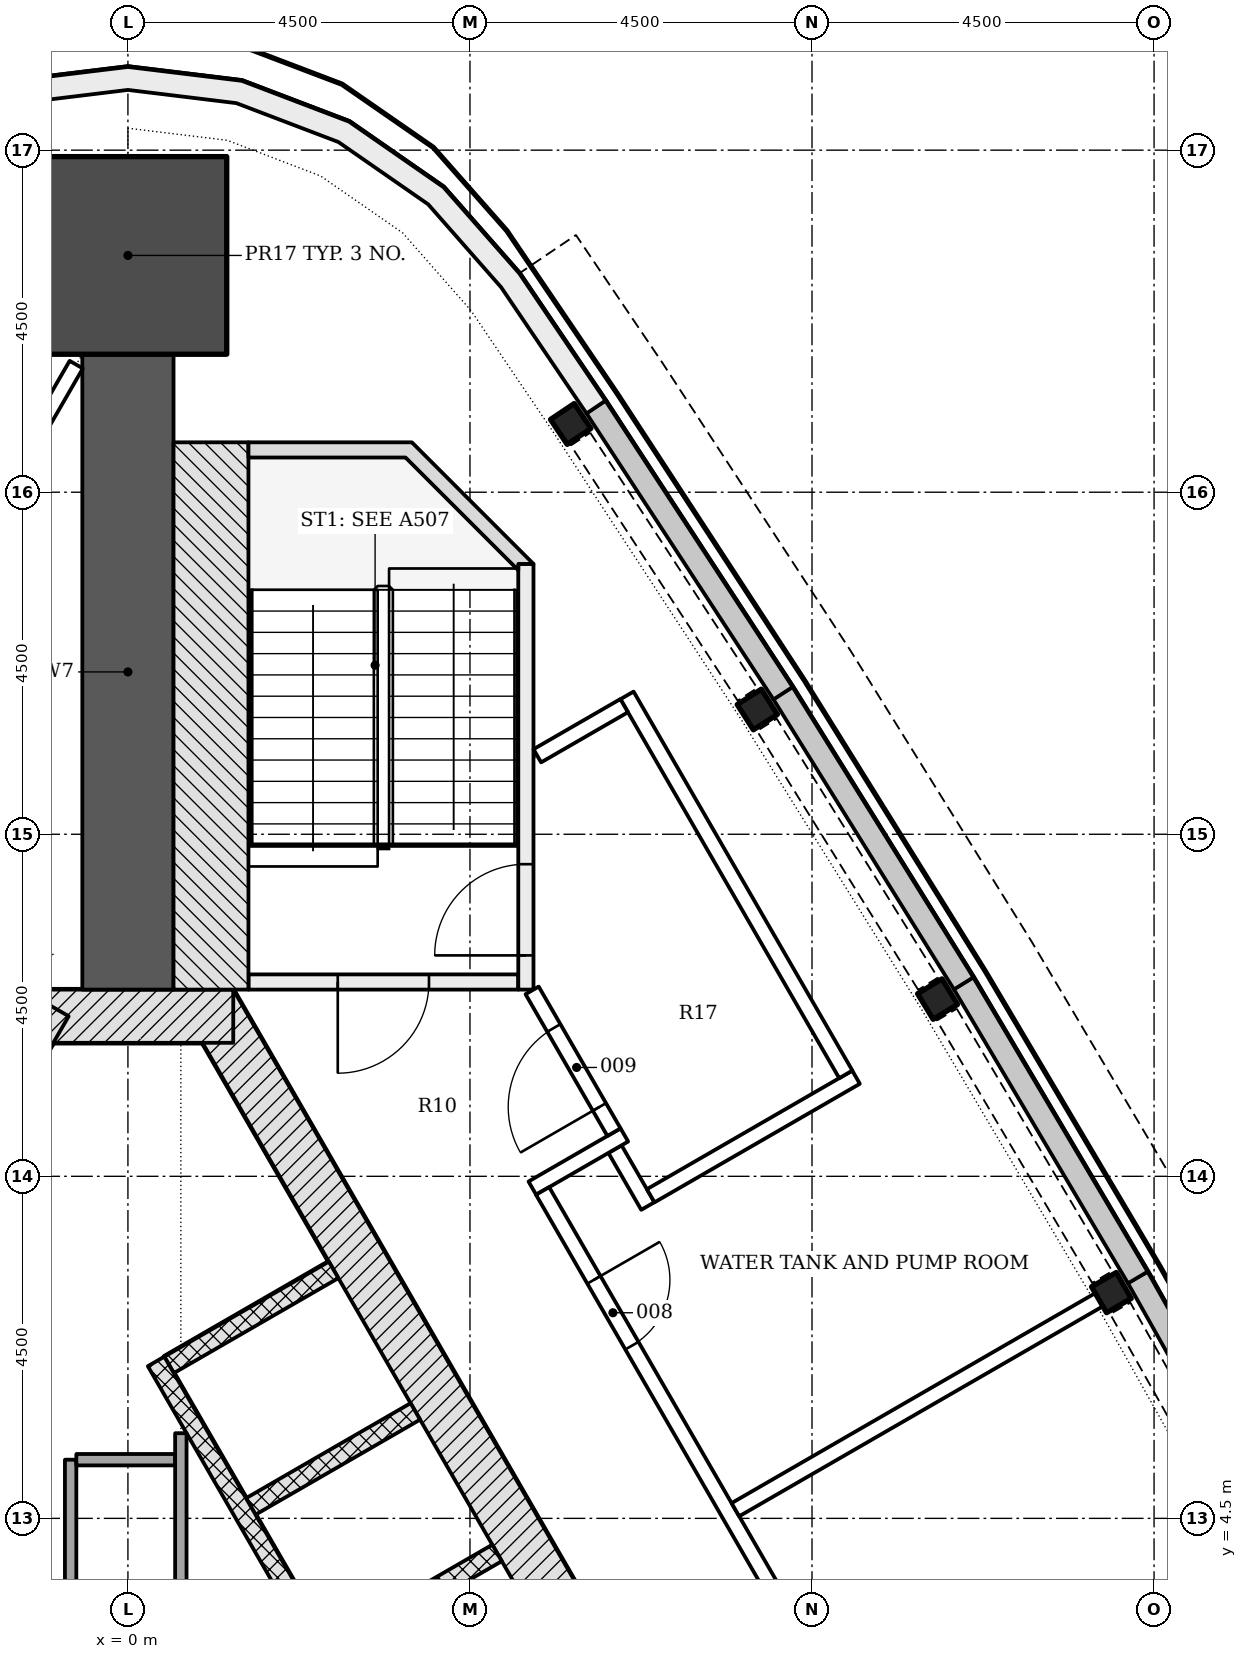
"""IFC4 building model, lengths in metres.
Left out: names, types, materials, properties, quantities, classifications, styles, units other than length and angle.
Written with IfcOpenShell. Run it as: python <this file> out.ifc"""

import sys

from ifc_helpers import new_model, si_unit, direction, frame, frame_2d, origin, origin_2d, place, context, subcontext, project, spatial, polyline, rectangle, i_section, outline, extrude, element, fill, save


model = new_model("IFC4")
c1 = context("Model", 3, precision=1e-05, world=origin(), true_north=direction((0.0, 1.0)))
c2 = subcontext(c1, "Body", "Model", "MODEL_VIEW")
j1 = project(units=[si_unit("LENGTHUNIT", "METRE"), si_unit("PLANEANGLEUNIT", "RADIAN")], contexts=[c1])
p1 = place(None, origin())
s1 = spatial("IfcSite", under=j1, at=p1, CompositionType="ELEMENT")
p2 = place(p1, origin())
s2 = spatial("IfcBuilding", under=s1, at=p2, CompositionType="ELEMENT")
p3 = place(p2, frame((0.0, 0.0, 210.3)))
s3 = spatial("IfcBuildingStorey", under=s2, at=p3, CompositionType="ELEMENT", Elevation=210.3)
p4 = place(p3, frame((10.311, -4.703, -0.3), z_axis=(0.0, 0.0, 1.0), x_axis=(-0.500001446645, 0.866024568562, 0.0)))
e1 = element("IfcWall", 1, at=p4, inside=s3, PredefinedType="SHEAR", context=c2, shape_type="SweptSolid", body=[
    extrude(rectangle(XDim=18.458, YDim=0.7, at=frame_2d((9.229, 0.0))), origin(), (0.0, 0.0, 1.0), 4.6),
])
p5 = place(p3, frame((1.386, 11.106, -0.3), z_axis=(0.0, 0.0, 1.0), x_axis=(-1.0, 0.0, 0.0)))
e2 = element("IfcWall", 2, at=p5, inside=s3, PredefinedType="SHEAR", context=c2, shape_type="SweptSolid", body=[
    extrude(rectangle(XDim=2.771, YDim=0.7, at=frame_2d((1.386, 0.0))), origin(), (0.0, 0.0, 1.0), 4.6),
])
p6 = place(p3, frame((-1.083, 11.281, -0.3), z_axis=(0.0, 0.0, 1.0), x_axis=(-0.500001446645, -0.866024568562, 0.0)))
e3 = element("IfcWall", 3, at=p6, inside=s3, PredefinedType="SHEAR", context=c2, shape_type="SweptSolid", body=[
    extrude(rectangle(XDim=18.458, YDim=0.7, at=frame_2d((9.229, 0.0))), origin(), (0.0, 0.0, 1.0), 4.6),
])
p7 = place(p6, frame((8.979, 0.0, 0.3)))
e4 = element("IfcOpeningElement", 4, at=p7, cuts=e3, PredefinedType="OPENING", context=c2, shape_type="SweptSolid", body=[
    extrude(rectangle(XDim=1.2, YDim=2.1, at=frame_2d((0.6, 1.05))), frame((0.0, 0.36, 0.0), z_axis=(0.0, -1.0, 0.0), x_axis=(1.0, 0.0, 0.0)), (0.0, 0.0, 1.0), 0.72),
])
p8 = place(p6, frame((11.029, 0.0, 0.3)))
e5 = element("IfcOpeningElement", 5, at=p8, cuts=e3, PredefinedType="OPENING", context=c2, shape_type="SweptSolid", body=[
    extrude(rectangle(XDim=1.2, YDim=2.1, at=frame_2d((0.6, 1.05))), frame((0.0, 0.36, 0.0), z_axis=(0.0, -1.0, 0.0), x_axis=(1.0, 0.0, 0.0)), (0.0, 0.0, 1.0), 0.72),
])
p9 = place(p3, frame((0.0, 11.456, -0.3), z_axis=(0.0, 0.0, 1.0), x_axis=(0.0, 1.0, 0.0)))
e6 = element("IfcWall", 6, at=p9, inside=s3, PredefinedType="SHEAR", context=c2, shape_type="SweptSolid", body=[
    extrude(rectangle(XDim=8.359, YDim=1.2, at=frame_2d((4.179, 0.0))), origin(), (0.0, 0.0, 1.0), 4.6),
])
p10 = place(p3, frame((0.0, 21.115, -0.3), z_axis=(0.0, 0.0, 1.0), x_axis=(0.0, 1.0, 0.0)))
e7 = element("IfcColumn", 7, at=p10, inside=s3, PredefinedType="COLUMN", context=c2, shape_type="SweptSolid", body=[
    extrude(rectangle(XDim=2.6, YDim=2.6, at=origin_2d()), origin(), (0.0, 0.0, 1.0), 4.6),
])
for number, where, z_axis, x_axis in (
    (8, (12.939, 7.47, -0.3), (0.0, 0.0, 1.0), (-0.5, 0.866, 0.0)),
    (9, (10.652, 11.332, -0.3), (0.0, 0.0, 1.0), (-0.519, 0.855, 0.0)),
    (10, (8.281, 15.142, -0.3), (0.0, 0.0, 1.0), (-0.538, 0.843, 0.0)),
    (11, (5.825, 18.898, -0.3), (0.0, 0.0, 1.0), (-0.556, 0.831, 0.0)),
):
    element("IfcColumn", number, at=place(p3, frame(where, z_axis=z_axis, x_axis=x_axis)), inside=s3, PredefinedType="COLUMN", context=c2, shape_type="SweptSolid", body=[
        extrude(i_section(OverallWidth=0.394, OverallDepth=0.376, WebThickness=0.017, FlangeThickness=0.028, FilletRadius=0.015, at=origin_2d()), origin(), (0.0, 0.0, 1.0), 4.6),
    ])
p11 = place(p3, origin())
e12 = element("IfcWall", 12, at=p11, inside=s3, PredefinedType="NOTDEFINED", context=c2, shape_type="SweptSolid", body=[
    extrude(outline(polyline([(15.622, 3.823), (13.415, 7.745), (13.154, 7.598), (15.36, 3.677), (15.622, 3.823)])), origin(), (0.0, 0.0, 1.0), 1.2),
])
p12 = place(p3, origin())
e13 = element("IfcWall", 13, at=p12, inside=s3, PredefinedType="NOTDEFINED", context=c2, shape_type="SweptSolid", body=[
    extrude(outline(polyline([(13.415, 7.745), (11.122, 11.617), (10.864, 11.464), (13.157, 7.592), (13.415, 7.745)])), origin(), (0.0, 0.0, 1.0), 1.2),
])
p13 = place(p3, origin())
e14 = element("IfcWall", 14, at=p13, inside=s3, PredefinedType="NOTDEFINED", context=c2, shape_type="SweptSolid", body=[
    extrude(outline(polyline([(11.122, 11.617), (8.744, 15.437), (8.49, 15.279), (10.867, 11.458), (11.122, 11.617)])), origin(), (0.0, 0.0, 1.0), 1.2),
])
p14 = place(p3, origin())
e15 = element("IfcWall", 15, at=p14, inside=s3, PredefinedType="NOTDEFINED", context=c2, shape_type="SweptSolid", body=[
    extrude(outline(polyline([(8.744, 15.437), (6.282, 19.204), (6.031, 19.04), (8.493, 15.273), (8.744, 15.437)])), origin(), (0.0, 0.0, 1.0), 1.2),
])
p15 = place(p3, origin())
e16 = element("IfcWall", 16, at=p15, inside=s3, PredefinedType="NOTDEFINED", context=c2, shape_type="SweptSolid", body=[
    extrude(outline(polyline([(6.282, 19.204), (5.149, 20.879), (4.151, 22.013), (2.911, 22.874), (1.499, 23.412), (0.0, 23.595), (-1.499, 23.412), (-2.911, 22.874), (-4.151, 22.013), (-5.149, 20.879), (-6.282, 19.204), (-6.034, 19.036), (-4.911, 20.695), (-3.95, 21.787), (-2.77, 22.607), (-1.427, 23.119), (0.0, 23.293), (1.427, 23.119), (2.77, 22.607), (3.95, 21.787), (4.911, 20.695), (6.034, 19.036), (6.282, 19.204)])), origin(), (0.0, 0.0, 1.0), 4.3),
])
for number, where, z_axis, x_axis in (
    (17, (4.856, 4.045, -0.3), (0.0, 0.0, 1.0), (-0.866, -0.5, 0.0)),
    (18, (3.781, 5.907, -0.3), (0.0, 0.0, 1.0), (-0.866, -0.5, 0.0)),
    (19, (2.706, 7.769, -0.3), (0.0, 0.0, 1.0), (-0.866, -0.5, 0.0)),
):
    element("IfcWall", number, at=place(p3, frame(where, z_axis=z_axis, x_axis=x_axis)), inside=s3, PredefinedType="PARTITIONING", context=c2, shape_type="SweptSolid", body=[
        extrude(rectangle(XDim=2.5, YDim=0.25, at=frame_2d((1.25, 0.0))), origin(), (0.0, 0.0, 1.0), 4.6),
    ])
p16 = place(p3, frame((5.87, -2.961, 0.0), z_axis=(0.0, 0.0, 1.0), x_axis=(-0.50000615651, 0.866021849293, 0.0)))
e20 = element("IfcWall", 20, at=p16, inside=s3, PredefinedType="PARTITIONING", context=c2, shape_type="SweptSolid", body=[
    extrude(rectangle(XDim=11.0, YDim=0.25, at=frame_2d((5.5, 0.0))), origin(), (0.0, 0.0, 1.0), 4.3),
])
p17 = place(p3, frame((-0.754, 5.272, 0.0), z_axis=(0.0, 0.0, 1.0), x_axis=(0.0, -1.0, 0.0)))
e21 = element("IfcWall", 21, at=p17, inside=s3, PredefinedType="PARTITIONING", context=c2, shape_type="SweptSolid", body=[
    extrude(rectangle(XDim=11.5, YDim=0.15, at=frame_2d((5.75, 0.0))), origin(), (0.0, 0.0, 1.0), 4.3),
])
p18 = place(p17, frame((3.701, 0.0, 0.0)))
e22 = element("IfcOpeningElement", 22, at=p18, cuts=e21, PredefinedType="OPENING", context=c2, shape_type="SweptSolid", body=[
    extrude(rectangle(XDim=0.9, YDim=2.1, at=frame_2d((0.45, 1.05))), frame((0.0, 0.085, 0.0), z_axis=(0.0, -1.0, 0.0), x_axis=(1.0, 0.0, 0.0)), (0.0, 0.0, 1.0), 0.17),
])
p19 = place(p3, frame((-0.679, 5.272, 0.0), z_axis=(0.0, 0.0, 1.0), x_axis=(1.0, 0.0, 0.0)))
e23 = element("IfcWall", 23, at=p19, inside=s3, PredefinedType="PARTITIONING", context=c2, shape_type="SweptSolid", body=[
    extrude(rectangle(XDim=1.3, YDim=0.15, at=frame_2d((0.65, 0.0))), origin(), (0.0, 0.0, 1.0), 4.3),
])
p20 = place(p3, frame((0.696, -5.928, 0.0), z_axis=(0.0, 0.0, 1.0), x_axis=(0.0, 1.0, 0.0)))
e24 = element("IfcWall", 24, at=p20, inside=s3, PredefinedType="PARTITIONING", context=c2, shape_type="SweptSolid", body=[
    extrude(rectangle(XDim=11.549, YDim=0.15, at=frame_2d((5.774, 0.0))), origin(), (0.0, 0.0, 1.0), 4.3),
])
p21 = place(p20, frame((6.6, 0.0, 0.0)))
e25 = element("IfcOpeningElement", 25, at=p21, cuts=e24, PredefinedType="OPENING", context=c2, shape_type="SweptSolid", body=[
    extrude(rectangle(XDim=0.9, YDim=2.1, at=frame_2d((0.45, 1.05))), frame((0.0, 0.085, 0.0), z_axis=(0.0, -1.0, 0.0), x_axis=(1.0, 0.0, 0.0)), (0.0, 0.0, 1.0), 0.17),
])
p22 = place(p3, frame((5.135, 11.556, -0.3), z_axis=(0.0, 0.0, 1.0), x_axis=(-1.0, 0.0, 0.0)))
e26 = element("IfcWall", 26, at=p22, inside=s3, PredefinedType="SHEAR", context=c2, shape_type="SweptSolid", body=[
    extrude(rectangle(XDim=3.55, YDim=0.2, at=frame_2d((1.775, 0.0))), origin(), (0.0, 0.0, 1.0), 4.6),
])
p23 = place(p22, frame((1.175, 0.0, 0.3)))
e27 = element("IfcOpeningElement", 27, at=p23, cuts=e26, PredefinedType="OPENING", context=c2, shape_type="SweptSolid", body=[
    extrude(rectangle(XDim=1.2, YDim=2.1, at=frame_2d((0.6, 1.05))), frame((0.0, 0.11, 0.0), z_axis=(0.0, -1.0, 0.0), x_axis=(1.0, 0.0, 0.0)), (0.0, 0.0, 1.0), 0.22),
])
p24 = place(p3, frame((5.236, 11.456, -0.3), z_axis=(0.0, 0.0, 1.0), x_axis=(0.0, 1.0, 0.0)))
e28 = element("IfcWall", 28, at=p24, inside=s3, PredefinedType="SHEAR", context=c2, shape_type="SweptSolid", body=[
    extrude(rectangle(XDim=5.6, YDim=0.2, at=frame_2d((2.8, 0.0))), origin(), (0.0, 0.0, 1.0), 4.6),
])
p25 = place(p24, frame((0.45, 0.0, 0.3)))
e29 = element("IfcOpeningElement", 29, at=p25, cuts=e28, PredefinedType="OPENING", context=c2, shape_type="SweptSolid", body=[
    extrude(rectangle(XDim=1.2, YDim=2.1, at=frame_2d((0.6, 1.05))), frame((0.0, 0.11, 0.0), z_axis=(0.0, -1.0, 0.0), x_axis=(1.0, 0.0, 0.0)), (0.0, 0.0, 1.0), 0.22),
])
p26 = place(p3, frame((1.093, 11.456, -0.3), z_axis=(0.0, 0.0, 1.0), x_axis=(0.0, 1.0, 0.0)))
e30 = element("IfcWall", 30, at=p26, inside=s3, PredefinedType="SHEAR", context=c2, shape_type="SweptSolid", body=[
    extrude(rectangle(XDim=7.2, YDim=0.986, at=frame_2d((3.6, 0.0))), origin(), (0.0, 0.0, 1.0), 4.6),
])
p27 = place(p3, frame((0.0, 0.0, -0.3)))
e31 = element("IfcWall", 31, at=p27, inside=s3, PredefinedType="SHEAR", context=c2, shape_type="SweptSolid", body=[
    extrude(outline(polyline([(5.336, 17.056), (3.736, 18.656), (1.586, 18.656), (1.586, 18.456), (3.653, 18.456), (5.135, 16.974), (5.135, 17.056), (5.135, 17.056), (5.135, 17.056), (5.135, 17.056), (5.135, 17.056), (5.135, 17.056), (5.135, 17.056), (5.135, 17.056), (5.135, 17.056), (5.135, 17.056), (5.135, 17.056), (5.135, 17.056), (5.135, 17.056), (5.135, 17.056), (5.135, 17.056), (5.135, 17.056), (5.135, 17.056), (5.336, 17.056)])), origin(), (0.0, 0.0, 1.0), 4.6),
])
p28 = place(p3, frame((-0.68, 19.678, 0.0), z_axis=(0.0, 0.0, 1.0), x_axis=(-0.49999622545, -0.866027583011, 0.0)))
e32 = element("IfcWall", 32, at=p28, inside=s3, PredefinedType="PARTITIONING", context=c2, shape_type="SweptSolid", body=[
    extrude(rectangle(XDim=23.956, YDim=0.2, at=frame_2d((11.978, 0.0))), origin(), (0.0, 0.0, 1.0), 3.752),
])
p29 = place(p28, frame((16.301, 0.0, 0.0)))
e33 = element("IfcOpeningElement", 33, at=p29, cuts=e32, PredefinedType="OPENING", context=c2, shape_type="SweptSolid", body=[
    extrude(rectangle(XDim=1.2, YDim=2.1, at=frame_2d((0.6, 1.05))), frame((0.0, 0.11, 0.0), z_axis=(0.0, -1.0, 0.0), x_axis=(1.0, 0.0, 0.0)), (0.0, 0.0, 1.0), 0.22),
])
p30 = place(p3, frame((6.408, 9.358, 0.0), z_axis=(0.0, 0.0, 1.0), x_axis=(0.49996696679, -0.866044474677, 0.0)))
e34 = element("IfcWall", 34, at=p30, inside=s3, PredefinedType="PARTITIONING", context=c2, shape_type="SweptSolid", body=[
    extrude(rectangle(XDim=0.864, YDim=0.2, at=frame_2d((0.432, 0.0))), origin(), (0.0, 0.0, 1.0), 3.752),
])
p31 = place(p3, frame((5.32, 8.845, 0.0), z_axis=(0.0, 0.0, 1.0), x_axis=(0.866031452229, 0.49998952364, 0.0)))
e35 = element("IfcWall", 35, at=p31, inside=s3, PredefinedType="PARTITIONING", context=c2, shape_type="SweptSolid", body=[
    extrude(rectangle(XDim=1.398, YDim=0.2, at=frame_2d((0.699, 0.0))), origin(), (0.0, 0.0, 1.0), 4.3),
])
p32 = place(p3, frame((6.395, 9.581, 0.0), z_axis=(0.0, 0.0, 1.0), x_axis=(-0.500003735859, 0.866023246874, 0.0)))
e36 = element("IfcWall", 36, at=p32, inside=s3, PredefinedType="PARTITIONING", context=c2, shape_type="SweptSolid", body=[
    extrude(rectangle(XDim=2.154, YDim=0.2, at=frame_2d((1.077, 0.0))), origin(), (0.0, 0.0, 1.0), 4.3),
])
p33 = place(p32, frame((0.383, 0.0, 0.0)))
e37 = element("IfcOpeningElement", 37, at=p33, cuts=e36, PredefinedType="OPENING", context=c2, shape_type="SweptSolid", body=[
    extrude(rectangle(XDim=1.2, YDim=2.1, at=frame_2d((0.6, 1.05))), frame((0.0, 0.11, 0.0), z_axis=(0.0, -1.0, 0.0), x_axis=(1.0, 0.0, 0.0)), (0.0, 0.0, 1.0), 0.22),
])
p34 = place(p3, frame((5.455, 8.808, 0.0), z_axis=(0.0, 0.0, 1.0), x_axis=(0.49999276215, -0.866029582519, 0.0)))
e38 = element("IfcWall", 38, at=p34, inside=s3, PredefinedType="PARTITIONING", context=c2, shape_type="SweptSolid", body=[
    extrude(rectangle(XDim=19.337, YDim=0.2, at=frame_2d((9.668, 0.0))), origin(), (0.0, 0.0, 1.0), 3.752),
])
p35 = place(p34, frame((11.705, 0.0, 0.0)))
e39 = element("IfcOpeningElement", 39, at=p35, cuts=e38, PredefinedType="OPENING", context=c2, shape_type="SweptSolid", body=[
    extrude(rectangle(XDim=1.0, YDim=2.1, at=frame_2d((0.5, 1.05))), frame((0.0, 0.11, 0.0), z_axis=(0.0, -1.0, 0.0), x_axis=(1.0, 0.0, 0.0)), (0.0, 0.0, 1.0), 0.22),
])
p36 = place(p34, frame((1.351, 0.0, 0.0)))
e40 = element("IfcOpeningElement", 40, at=p36, cuts=e38, PredefinedType="OPENING", context=c2, shape_type="SweptSolid", body=[
    extrude(rectangle(XDim=1.0, YDim=2.1, at=frame_2d((0.5, 1.05))), frame((0.0, 0.11, 0.0), z_axis=(0.0, -1.0, 0.0), x_axis=(1.0, 0.0, 0.0)), (0.0, 0.0, 1.0), 0.22),
])
p37 = place(p3, frame((7.992, 4.614, 0.0), z_axis=(0.0, 0.0, 1.0), x_axis=(0.866008693241, 0.500028942393, 0.0)))
e41 = element("IfcWall", 41, at=p37, inside=s3, PredefinedType="PARTITIONING", context=c2, shape_type="SweptSolid", body=[
    extrude(rectangle(XDim=5.562, YDim=0.2, at=frame_2d((2.781, 0.0))), origin(), (0.0, 0.0, 1.0), 3.752),
])
p38 = place(p3, frame((6.878, 8.744, 0.0), z_axis=(0.0, 0.0, 1.0), x_axis=(0.866023983177, 0.500002460556, 0.0)))
e42 = element("IfcWall", 42, at=p38, inside=s3, PredefinedType="PARTITIONING", context=c2, shape_type="SweptSolid", body=[
    extrude(rectangle(XDim=3.12, YDim=0.2, at=frame_2d((1.56, 0.0))), origin(), (0.0, 0.0, 1.0), 4.3),
])
p39 = place(p3, frame((6.566, 15.327, 0.0), z_axis=(0.0, 0.0, 1.0), x_axis=(0.499997778408, -0.866026686418, 0.0)))
e43 = element("IfcWall", 43, at=p39, inside=s3, PredefinedType="PARTITIONING", context=c2, shape_type="SweptSolid", body=[
    extrude(rectangle(XDim=5.757, YDim=0.2, at=frame_2d((2.878, 0.0))), origin(), (0.0, 0.0, 1.0), 3.752),
])
p40 = place(p3, frame((6.529, 15.192, 0.0), z_axis=(0.0, 0.0, 1.0), x_axis=(-0.866117824122, -0.499839889103, 0.0)))
e44 = element("IfcWall", 44, at=p40, inside=s3, PredefinedType="PARTITIONING", context=c2, shape_type="SweptSolid", body=[
    extrude(rectangle(XDim=1.32, YDim=0.2, at=frame_2d((0.66, 0.0))), origin(), (0.0, 0.0, 1.0), 4.3),
])
p41 = place(p23, origin())
e45 = element("IfcDoor", 45, at=p41, inside=s3, OperationType="SINGLE_SWING_RIGHT", PredefinedType="DOOR", context=c2, shape_type="SweptSolid", body=[
    extrude(rectangle(XDim=1.2, YDim=2.1, at=frame_2d((0.6, 1.05))), frame((0.0, 0.025, 0.0), z_axis=(0.0, -1.0, 0.0), x_axis=(1.0, 0.0, 0.0)), (0.0, 0.0, 1.0), 0.05),
])
fill(e27, e45)
p42 = place(p25, origin())
e46 = element("IfcDoor", 46, at=p42, inside=s3, OperationType="SINGLE_SWING_LEFT", PredefinedType="DOOR", context=c2, shape_type="SweptSolid", body=[
    extrude(rectangle(XDim=1.2, YDim=2.1, at=frame_2d((0.6, 1.05))), frame((0.0, 0.025, 0.0), z_axis=(0.0, -1.0, 0.0), x_axis=(1.0, 0.0, 0.0)), (0.0, 0.0, 1.0), 0.05),
])
fill(e29, e46)
p43 = place(p36, origin())
e47 = element("IfcDoor", 47, at=p43, inside=s3, OperationType="SINGLE_SWING_LEFT", PredefinedType="DOOR", context=c2, shape_type="SweptSolid", body=[
    extrude(rectangle(XDim=1.0, YDim=2.1, at=frame_2d((0.5, 1.05))), frame((0.0, 0.025, 0.0), z_axis=(0.0, -1.0, 0.0), x_axis=(1.0, 0.0, 0.0)), (0.0, 0.0, 1.0), 0.05),
])
fill(e40, e47)
p44 = place(p33, origin())
e48 = element("IfcDoor", 48, at=p44, inside=s3, OperationType="SINGLE_SWING_LEFT", PredefinedType="DOOR", context=c2, shape_type="SweptSolid", body=[
    extrude(rectangle(XDim=1.2, YDim=2.1, at=frame_2d((0.6, 1.05))), frame((0.0, 0.025, 0.0), z_axis=(0.0, -1.0, 0.0), x_axis=(1.0, 0.0, 0.0)), (0.0, 0.0, 1.0), 0.05),
])
fill(e37, e48)
save(model, sys.argv[1])
